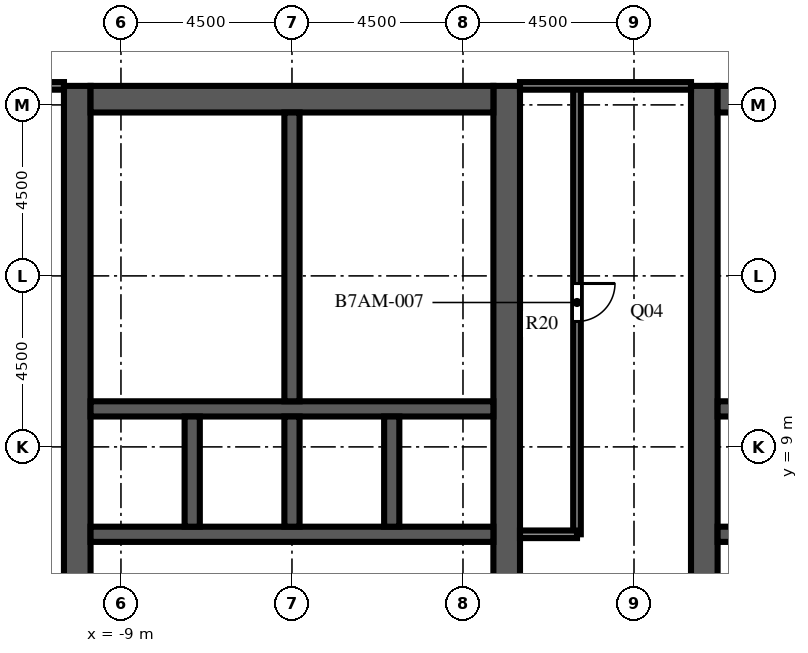
"""IFC4 building model, lengths in metres.
Left out: names, types, materials, properties, quantities, classifications, styles, units other than length and angle.
Written with IfcOpenShell. Run it as: python <this file> out.ifc"""

import sys

from ifc_helpers import new_model, si_unit, direction, frame, frame_2d, origin, place, context, subcontext, project, spatial, rectangle, extrude, element, fill, save


model = new_model("IFC4")
c1 = context("Model", 3, precision=1e-05, world=origin(), true_north=direction((0.0, 1.0)))
c2 = subcontext(c1, "Body", "Model", "MODEL_VIEW")
j1 = project(units=[si_unit("LENGTHUNIT", "METRE"), si_unit("PLANEANGLEUNIT", "RADIAN")], contexts=[c1])
p1 = place(None, origin())
s1 = spatial("IfcSite", under=j1, at=p1, CompositionType="ELEMENT")
p2 = place(p1, origin())
s2 = spatial("IfcBuilding", under=s1, at=p2, CompositionType="ELEMENT")
p3 = place(p2, frame((0.0, 0.0, 260.3)))
s3 = spatial("IfcBuildingStorey", under=s2, at=p3, CompositionType="ELEMENT", Elevation=260.3)
p4 = place(p3, frame((-10.15, -9.0, 0.0), z_axis=(0.0, 0.0, 1.0), x_axis=(0.0, 1.0, 0.0)))
e1 = element("IfcWall", 1, at=p4, inside=s3, PredefinedType="SHEAR", context=c2, shape_type="SweptSolid", body=[
    extrude(rectangle(XDim=27.5, YDim=0.7, at=frame_2d((13.75, 0.0))), origin(), (0.0, 0.0, 1.0), 6.0),
])
p5 = place(p4, frame((12.55, 0.0, 0.0)))
e2 = element("IfcOpeningElement", 2, at=p5, cuts=e1, PredefinedType="OPENING", context=c2, shape_type="SweptSolid", body=[
    extrude(rectangle(XDim=2.4, YDim=2.4, at=frame_2d((1.2, 1.2))), frame((0.0, 0.36, 0.0), z_axis=(0.0, -1.0, 0.0), x_axis=(1.0, 0.0, 0.0)), (0.0, 0.0, 1.0), 0.72),
])
p6 = place(p4, frame((6.825, 0.0, 0.0)))
e3 = element("IfcOpeningElement", 3, at=p6, cuts=e1, PredefinedType="OPENING", context=c2, shape_type="SweptSolid", body=[
    extrude(rectangle(XDim=1.2, YDim=2.1, at=frame_2d((0.6, 1.05))), frame((0.0, 0.36, 0.0), z_axis=(0.0, -1.0, 0.0), x_axis=(1.0, 0.0, 0.0)), (0.0, 0.0, 1.0), 0.72),
])
p7 = place(p4, frame((19.475, 0.0, 0.0)))
e4 = element("IfcOpeningElement", 4, at=p7, cuts=e1, PredefinedType="OPENING", context=c2, shape_type="SweptSolid", body=[
    extrude(rectangle(XDim=1.2, YDim=2.1, at=frame_2d((0.6, 1.05))), frame((0.0, 0.36, 0.0), z_axis=(0.0, -1.0, 0.0), x_axis=(1.0, 0.0, 0.0)), (0.0, 0.0, 1.0), 0.72),
])
p8 = place(p3, frame((1.15, -9.0, 0.0), z_axis=(0.0, 0.0, 1.0), x_axis=(0.0, 1.0, 0.0)))
e5 = element("IfcWall", 5, at=p8, inside=s3, PredefinedType="SHEAR", context=c2, shape_type="SweptSolid", body=[
    extrude(rectangle(XDim=27.5, YDim=0.7, at=frame_2d((13.75, 0.0))), origin(), (0.0, 0.0, 1.0), 6.0),
])
p9 = place(p8, frame((12.55, 0.0, 0.0)))
e6 = element("IfcOpeningElement", 6, at=p9, cuts=e5, PredefinedType="OPENING", context=c2, shape_type="SweptSolid", body=[
    extrude(rectangle(XDim=2.4, YDim=2.4, at=frame_2d((1.2, 1.2))), frame((0.0, 0.36, 0.0), z_axis=(0.0, -1.0, 0.0), x_axis=(1.0, 0.0, 0.0)), (0.0, 0.0, 1.0), 0.72),
])
p10 = place(p8, frame((3.788, 0.0, 0.0)))
e7 = element("IfcOpeningElement", 7, at=p10, cuts=e5, PredefinedType="OPENING", context=c2, shape_type="SweptSolid", body=[
    extrude(rectangle(XDim=0.968, YDim=2.1, at=frame_2d((0.484, 1.05))), frame((0.0, 0.36, 0.0), z_axis=(0.0, -1.0, 0.0), x_axis=(1.0, 0.0, 0.0)), (0.0, 0.0, 1.0), 0.72),
])
p11 = place(p8, frame((23.54, 0.0, 0.0)))
e8 = element("IfcOpeningElement", 8, at=p11, cuts=e5, PredefinedType="OPENING", context=c2, shape_type="SweptSolid", body=[
    extrude(rectangle(XDim=1.2, YDim=2.1, at=frame_2d((0.6, 1.05))), frame((0.0, 0.36, 0.0), z_axis=(0.0, -1.0, 0.0), x_axis=(1.0, 0.0, 0.0)), (0.0, 0.0, 1.0), 0.72),
])
p12 = place(p3, frame((-9.8, 18.15, 0.0), z_axis=(0.0, 0.0, 1.0), x_axis=(1.0, 0.0, 0.0)))
e9 = element("IfcWall", 9, at=p12, inside=s3, PredefinedType="SHEAR", context=c2, shape_type="SweptSolid", body=[
    extrude(rectangle(XDim=10.6, YDim=0.7, at=frame_2d((5.3, 0.0))), origin(), (0.0, 0.0, 1.0), 6.0),
])
p13 = place(p3, frame((-9.8, 6.7, 0.0), z_axis=(0.0, 0.0, 1.0), x_axis=(1.0, 0.0, 0.0)))
e10 = element("IfcWall", 10, at=p13, inside=s3, PredefinedType="SHEAR", context=c2, shape_type="SweptSolid", body=[
    extrude(rectangle(XDim=10.6, YDim=0.4, at=frame_2d((5.3, 0.0))), origin(), (0.0, 0.0, 1.0), 6.0),
])
p14 = place(p13, frame((3.438, 0.0, 0.0)))
e11 = element("IfcOpeningElement", 11, at=p14, cuts=e10, PredefinedType="OPENING", context=c2, shape_type="SweptSolid", body=[
    extrude(rectangle(XDim=1.1, YDim=2.1, at=frame_2d((0.55, 1.05))), frame((0.0, 0.21, 0.0), z_axis=(0.0, -1.0, 0.0), x_axis=(1.0, 0.0, 0.0)), (0.0, 0.0, 1.0), 0.42),
])
p15 = place(p13, frame((6.062, 0.0, 0.0)))
e12 = element("IfcOpeningElement", 12, at=p15, cuts=e10, PredefinedType="OPENING", context=c2, shape_type="SweptSolid", body=[
    extrude(rectangle(XDim=1.1, YDim=2.1, at=frame_2d((0.55, 1.05))), frame((0.0, 0.21, 0.0), z_axis=(0.0, -1.0, 0.0), x_axis=(1.0, 0.0, 0.0)), (0.0, 0.0, 1.0), 0.42),
])
p16 = place(p13, frame((8.812, 0.0, 0.0)))
e13 = element("IfcOpeningElement", 13, at=p16, cuts=e10, PredefinedType="OPENING", context=c2, shape_type="SweptSolid", body=[
    extrude(rectangle(XDim=1.1, YDim=2.1, at=frame_2d((0.55, 1.05))), frame((0.0, 0.21, 0.0), z_axis=(0.0, -1.0, 0.0), x_axis=(1.0, 0.0, 0.0)), (0.0, 0.0, 1.0), 0.42),
])
p17 = place(p13, frame((0.738, 0.0, 0.0)))
e14 = element("IfcOpeningElement", 14, at=p17, cuts=e10, PredefinedType="OPENING", context=c2, shape_type="SweptSolid", body=[
    extrude(rectangle(XDim=1.0, YDim=2.1, at=frame_2d((0.5, 1.05))), frame((0.0, 0.21, 0.0), z_axis=(0.0, -1.0, 0.0), x_axis=(1.0, 0.0, 0.0)), (0.0, 0.0, 1.0), 0.42),
])
p18 = place(p3, frame((-9.8, 10.0, 0.0), z_axis=(0.0, 0.0, 1.0), x_axis=(1.0, 0.0, 0.0)))
e15 = element("IfcWall", 15, at=p18, inside=s3, PredefinedType="SHEAR", context=c2, shape_type="SweptSolid", body=[
    extrude(rectangle(XDim=10.6, YDim=0.4, at=frame_2d((5.3, 0.0))), origin(), (0.0, 0.0, 1.0), 6.0),
])
for number, where, z_axis, x_axis in (
    (16, (-7.125, 6.9, 0.0), (0.0, 0.0, 1.0), (0.0, 1.0, 0.0)),
    (17, (-4.5, 6.9, 0.0), (0.0, 0.0, 1.0), (0.0, 1.0, 0.0)),
    (18, (-1.875, 6.9, 0.0), (0.0, 0.0, 1.0), (0.0, 1.0, 0.0)),
):
    element("IfcWall", number, at=place(p3, frame(where, z_axis=z_axis, x_axis=x_axis)), inside=s3, PredefinedType="SHEAR", context=c2, shape_type="SweptSolid", body=[
        extrude(rectangle(XDim=2.9, YDim=0.4, at=frame_2d((1.45, 0.0))), origin(), (0.0, 0.0, 1.0), 6.0),
    ])
p19 = place(p3, frame((-4.5, 10.2, 0.0), z_axis=(0.0, 0.0, 1.0), x_axis=(0.0, 1.0, 0.0)))
e19 = element("IfcWall", 19, at=p19, inside=s3, PredefinedType="SHEAR", context=c2, shape_type="SweptSolid", body=[
    extrude(rectangle(XDim=7.6, YDim=0.4, at=frame_2d((3.8, 0.0))), origin(), (0.0, 0.0, 1.0), 6.0),
])
p20 = place(p3, frame((6.35, -9.0, 0.0), z_axis=(0.0, 0.0, 1.0), x_axis=(0.0, 1.0, 0.0)))
e20 = element("IfcWall", 20, at=p20, inside=s3, PredefinedType="SHEAR", context=c2, shape_type="SweptSolid", body=[
    extrude(rectangle(XDim=27.5, YDim=0.7, at=frame_2d((13.75, 0.0))), origin(), (0.0, 0.0, 1.0), 6.0),
])
p21 = place(p20, frame((12.55, 0.0, 0.0)))
e21 = element("IfcOpeningElement", 21, at=p21, cuts=e20, PredefinedType="OPENING", context=c2, shape_type="SweptSolid", body=[
    extrude(rectangle(XDim=2.4, YDim=2.4, at=frame_2d((1.2, 1.2))), frame((0.0, 0.36, 0.0), z_axis=(0.0, -1.0, 0.0), x_axis=(1.0, 0.0, 0.0)), (0.0, 0.0, 1.0), 0.72),
])
p22 = place(p20, frame((3.788, 0.0, 0.0)))
e22 = element("IfcOpeningElement", 22, at=p22, cuts=e20, PredefinedType="OPENING", context=c2, shape_type="SweptSolid", body=[
    extrude(rectangle(XDim=0.968, YDim=2.1, at=frame_2d((0.484, 1.05))), frame((0.0, 0.36, 0.0), z_axis=(0.0, -1.0, 0.0), x_axis=(1.0, 0.0, 0.0)), (0.0, 0.0, 1.0), 0.72),
])
p23 = place(p20, frame((23.54, 0.0, 0.0)))
e23 = element("IfcOpeningElement", 23, at=p23, cuts=e20, PredefinedType="OPENING", context=c2, shape_type="SweptSolid", body=[
    extrude(rectangle(XDim=1.2, YDim=2.1, at=frame_2d((0.6, 1.05))), frame((0.0, 0.36, 0.0), z_axis=(0.0, -1.0, 0.0), x_axis=(1.0, 0.0, 0.0)), (0.0, 0.0, 1.0), 0.72),
])
p24 = place(p3, frame((6.7, 18.15, 0.0), z_axis=(0.0, 0.0, 1.0), x_axis=(1.0, 0.0, 0.0)))
e24 = element("IfcWall", 24, at=p24, inside=s3, PredefinedType="SHEAR", context=c2, shape_type="SweptSolid", body=[
    extrude(rectangle(XDim=10.6, YDim=0.7, at=frame_2d((5.3, 0.0))), origin(), (0.0, 0.0, 1.0), 6.0),
])
p25 = place(p3, frame((6.7, 6.7, 0.0), z_axis=(0.0, 0.0, 1.0), x_axis=(1.0, 0.0, 0.0)))
e25 = element("IfcWall", 25, at=p25, inside=s3, PredefinedType="SHEAR", context=c2, shape_type="SweptSolid", body=[
    extrude(rectangle(XDim=10.6, YDim=0.4, at=frame_2d((5.3, 0.0))), origin(), (0.0, 0.0, 1.0), 6.0),
])
p26 = place(p25, frame((3.438, 0.0, 0.0)))
e26 = element("IfcOpeningElement", 26, at=p26, cuts=e25, PredefinedType="OPENING", context=c2, shape_type="SweptSolid", body=[
    extrude(rectangle(XDim=1.1, YDim=2.1, at=frame_2d((0.55, 1.05))), frame((0.0, 0.21, 0.0), z_axis=(0.0, -1.0, 0.0), x_axis=(1.0, 0.0, 0.0)), (0.0, 0.0, 1.0), 0.42),
])
p27 = place(p25, frame((6.062, 0.0, 0.0)))
e27 = element("IfcOpeningElement", 27, at=p27, cuts=e25, PredefinedType="OPENING", context=c2, shape_type="SweptSolid", body=[
    extrude(rectangle(XDim=1.1, YDim=2.1, at=frame_2d((0.55, 1.05))), frame((0.0, 0.21, 0.0), z_axis=(0.0, -1.0, 0.0), x_axis=(1.0, 0.0, 0.0)), (0.0, 0.0, 1.0), 0.42),
])
p28 = place(p25, frame((8.812, 0.0, 0.0)))
e28 = element("IfcOpeningElement", 28, at=p28, cuts=e25, PredefinedType="OPENING", context=c2, shape_type="SweptSolid", body=[
    extrude(rectangle(XDim=1.1, YDim=2.1, at=frame_2d((0.55, 1.05))), frame((0.0, 0.21, 0.0), z_axis=(0.0, -1.0, 0.0), x_axis=(1.0, 0.0, 0.0)), (0.0, 0.0, 1.0), 0.42),
])
p29 = place(p25, frame((0.738, 0.0, 0.0)))
e29 = element("IfcOpeningElement", 29, at=p29, cuts=e25, PredefinedType="OPENING", context=c2, shape_type="SweptSolid", body=[
    extrude(rectangle(XDim=1.0, YDim=2.1, at=frame_2d((0.5, 1.05))), frame((0.0, 0.21, 0.0), z_axis=(0.0, -1.0, 0.0), x_axis=(1.0, 0.0, 0.0)), (0.0, 0.0, 1.0), 0.42),
])
p30 = place(p3, frame((6.7, 10.0, 0.0), z_axis=(0.0, 0.0, 1.0), x_axis=(1.0, 0.0, 0.0)))
e30 = element("IfcWall", 30, at=p30, inside=s3, PredefinedType="SHEAR", context=c2, shape_type="SweptSolid", body=[
    extrude(rectangle(XDim=10.6, YDim=0.4, at=frame_2d((5.3, 0.0))), origin(), (0.0, 0.0, 1.0), 6.0),
])
p31 = place(p3, frame((-0.5, 12.48, 0.0), z_axis=(0.0, 0.0, 1.0), x_axis=(1.0, 0.0, 0.0)))
e31 = element("IfcWall", 31, at=p31, inside=s3, PredefinedType="PARTITIONING", context=c2, shape_type="SweptSolid", body=[
    extrude(rectangle(XDim=1.3, YDim=0.1, at=frame_2d((0.65, 0.0))), origin(), (0.0, 0.0, 1.0), 5.55),
])
p32 = place(p31, frame((0.2, 0.0, 0.0)))
e32 = element("IfcOpeningElement", 32, at=p32, cuts=e31, PredefinedType="OPENING", context=c2, shape_type="SweptSolid", body=[
    extrude(rectangle(XDim=0.9, YDim=2.1, at=frame_2d((0.45, 1.05))), frame((0.0, 0.06, 0.0), z_axis=(0.0, -1.0, 0.0), x_axis=(1.0, 0.0, 0.0)), (0.0, 0.0, 1.0), 0.12),
])
p33 = place(p3, frame((-4.3, 12.48, 0.0), z_axis=(0.0, 0.0, 1.0), x_axis=(1.0, 0.0, 0.0)))
e33 = element("IfcWall", 33, at=p33, inside=s3, PredefinedType="PARTITIONING", context=c2, shape_type="SweptSolid", body=[
    extrude(rectangle(XDim=3.8, YDim=0.1, at=frame_2d((1.9, 0.0))), origin(), (0.0, 0.0, 1.0), 5.55),
])
p34 = place(p3, frame((-0.5, 12.48, 0.0), z_axis=(0.0, 0.0, 1.0), x_axis=(0.0, 1.0, 0.0)))
e34 = element("IfcWall", 34, at=p34, inside=s3, PredefinedType="PARTITIONING", context=c2, shape_type="SweptSolid", body=[
    extrude(rectangle(XDim=2.66, YDim=0.1, at=frame_2d((1.33, 0.0))), origin(), (0.0, 0.0, 1.0), 5.55),
])
p35 = place(p34, frame((0.83, 0.0, 0.0)))
e35 = element("IfcOpeningElement", 35, at=p35, cuts=e34, PredefinedType="OPENING", context=c2, shape_type="SweptSolid", body=[
    extrude(rectangle(XDim=1.0, YDim=2.1, at=frame_2d((0.5, 1.05))), frame((0.0, 0.06, 0.0), z_axis=(0.0, -1.0, 0.0), x_axis=(1.0, 0.0, 0.0)), (0.0, 0.0, 1.0), 0.12),
])
p36 = place(p3, frame((-0.5, 15.14, 0.0), z_axis=(0.0, 0.0, 1.0), x_axis=(0.0, 1.0, 0.0)))
e36 = element("IfcWall", 36, at=p36, inside=s3, PredefinedType="PARTITIONING", context=c2, shape_type="SweptSolid", body=[
    extrude(rectangle(XDim=2.66, YDim=0.1, at=frame_2d((1.33, 0.0))), origin(), (0.0, 0.0, 1.0), 5.55),
])
p37 = place(p36, frame((0.83, 0.0, 0.0)))
e37 = element("IfcOpeningElement", 37, at=p37, cuts=e36, PredefinedType="OPENING", context=c2, shape_type="SweptSolid", body=[
    extrude(rectangle(XDim=1.0, YDim=2.1, at=frame_2d((0.5, 1.05))), frame((0.0, 0.06, 0.0), z_axis=(0.0, -1.0, 0.0), x_axis=(1.0, 0.0, 0.0)), (0.0, 0.0, 1.0), 0.12),
])
p38 = place(p3, frame((-4.3, 15.14, 0.0), z_axis=(0.0, 0.0, 1.0), x_axis=(1.0, 0.0, 0.0)))
e38 = element("IfcWall", 38, at=p38, inside=s3, PredefinedType="PARTITIONING", context=c2, shape_type="SweptSolid", body=[
    extrude(rectangle(XDim=3.8, YDim=0.1, at=frame_2d((1.9, 0.0))), origin(), (0.0, 0.0, 1.0), 5.55),
])
p39 = place(p3, frame((6.7, 12.48, 0.0), z_axis=(0.0, 0.0, 1.0), x_axis=(1.0, 0.0, 0.0)))
e39 = element("IfcWall", 39, at=p39, inside=s3, PredefinedType="PARTITIONING", context=c2, shape_type="SweptSolid", body=[
    extrude(rectangle(XDim=1.3, YDim=0.1, at=frame_2d((0.65, 0.0))), origin(), (0.0, 0.0, 1.0), 5.55),
])
p40 = place(p39, frame((0.2, 0.0, 0.0)))
e40 = element("IfcOpeningElement", 40, at=p40, cuts=e39, PredefinedType="OPENING", context=c2, shape_type="SweptSolid", body=[
    extrude(rectangle(XDim=0.9, YDim=2.1, at=frame_2d((0.45, 1.05))), frame((0.0, 0.06, 0.0), z_axis=(0.0, -1.0, 0.0), x_axis=(1.0, 0.0, 0.0)), (0.0, 0.0, 1.0), 0.12),
])
p41 = place(p3, frame((3.0, 6.7, 0.0), z_axis=(0.0, 0.0, 1.0), x_axis=(0.0, 1.0, 0.0)))
e41 = element("IfcWall", 41, at=p41, inside=s3, PredefinedType="PARTITIONING", context=c2, shape_type="SweptSolid", body=[
    extrude(rectangle(XDim=11.8, YDim=0.2, at=frame_2d((5.9, 0.0))), origin(), (0.0, 0.0, 1.0), 5.55),
])
p42 = place(p41, frame((5.6, 0.0, 0.0)))
e42 = element("IfcOpeningElement", 42, at=p42, cuts=e41, PredefinedType="OPENING", context=c2, shape_type="SweptSolid", body=[
    extrude(rectangle(XDim=1.0, YDim=2.1, at=frame_2d((0.5, 1.05))), frame((0.0, 0.11, 0.0), z_axis=(0.0, -1.0, 0.0), x_axis=(1.0, 0.0, 0.0)), (0.0, 0.0, 1.0), 0.22),
])
p43 = place(p3, frame((1.5, 6.7, 0.0), z_axis=(0.0, 0.0, 1.0), x_axis=(1.0, 0.0, 0.0)))
e43 = element("IfcWall", 43, at=p43, inside=s3, PredefinedType="PARTITIONING", context=c2, shape_type="SweptSolid", body=[
    extrude(rectangle(XDim=1.5, YDim=0.2, at=frame_2d((0.75, 0.0))), origin(), (0.0, 0.0, 1.0), 5.55),
])
p44 = place(p3, frame((-13.5, 18.5, 0.0), z_axis=(0.0, 0.0, 1.0), x_axis=(1.0, 0.0, 0.0)))
e44 = element("IfcWall", 44, at=p44, inside=s3, PredefinedType="PARTITIONING", context=c2, shape_type="SweptSolid", body=[
    extrude(rectangle(XDim=3.0, YDim=0.2, at=frame_2d((1.5, 0.0))), origin(), (0.0, 0.0, 1.0), 3.72),
])
p45 = place(p3, frame((1.5, 18.5, 0.0), z_axis=(0.0, 0.0, 1.0), x_axis=(1.0, 0.0, 0.0)))
e45 = element("IfcWall", 45, at=p45, inside=s3, PredefinedType="PARTITIONING", context=c2, shape_type="SweptSolid", body=[
    extrude(rectangle(XDim=4.5, YDim=0.2, at=frame_2d((2.25, 0.0))), origin(), (0.0, 0.0, 1.0), 5.55),
])
p46 = place(p14, origin())
e46 = element("IfcDoor", 46, at=p46, inside=s3, OperationType="DOUBLE_DOOR_SLIDING", PredefinedType="DOOR", context=c2, shape_type="SweptSolid", body=[
    extrude(rectangle(XDim=1.1, YDim=2.1, at=frame_2d((0.55, 1.05))), frame((0.0, 0.025, 0.0), z_axis=(0.0, -1.0, 0.0), x_axis=(1.0, 0.0, 0.0)), (0.0, 0.0, 1.0), 0.05),
])
fill(e11, e46)
p47 = place(p15, origin())
e47 = element("IfcDoor", 47, at=p47, inside=s3, OperationType="DOUBLE_DOOR_SLIDING", PredefinedType="DOOR", context=c2, shape_type="SweptSolid", body=[
    extrude(rectangle(XDim=1.1, YDim=2.1, at=frame_2d((0.55, 1.05))), frame((0.0, 0.025, 0.0), z_axis=(0.0, -1.0, 0.0), x_axis=(1.0, 0.0, 0.0)), (0.0, 0.0, 1.0), 0.05),
])
fill(e12, e47)
p48 = place(p16, origin())
e48 = element("IfcDoor", 48, at=p48, inside=s3, OperationType="DOUBLE_DOOR_SLIDING", PredefinedType="DOOR", context=c2, shape_type="SweptSolid", body=[
    extrude(rectangle(XDim=1.1, YDim=2.1, at=frame_2d((0.55, 1.05))), frame((0.0, 0.025, 0.0), z_axis=(0.0, -1.0, 0.0), x_axis=(1.0, 0.0, 0.0)), (0.0, 0.0, 1.0), 0.05),
])
fill(e13, e48)
p49 = place(p5, origin())
e49 = element("IfcDoor", 49, at=p49, inside=s3, OperationType="DOUBLE_DOOR_DOUBLE_SWING", PredefinedType="DOOR", context=c2, shape_type="SweptSolid", body=[
    extrude(rectangle(XDim=2.4, YDim=2.4, at=frame_2d((1.2, 1.2))), frame((0.0, 0.025, 0.0), z_axis=(0.0, -1.0, 0.0), x_axis=(1.0, 0.0, 0.0)), (0.0, 0.0, 1.0), 0.05),
])
fill(e2, e49)
p50 = place(p9, origin())
e50 = element("IfcDoor", 50, at=p50, inside=s3, OperationType="DOUBLE_DOOR_DOUBLE_SWING", PredefinedType="DOOR", context=c2, shape_type="SweptSolid", body=[
    extrude(rectangle(XDim=2.4, YDim=2.4, at=frame_2d((1.2, 1.2))), frame((0.0, 0.025, 0.0), z_axis=(0.0, -1.0, 0.0), x_axis=(1.0, 0.0, 0.0)), (0.0, 0.0, 1.0), 0.05),
])
fill(e6, e50)
p51 = place(p21, origin())
e51 = element("IfcDoor", 51, at=p51, inside=s3, OperationType="DOUBLE_DOOR_DOUBLE_SWING", PredefinedType="DOOR", context=c2, shape_type="SweptSolid", body=[
    extrude(rectangle(XDim=2.4, YDim=2.4, at=frame_2d((1.2, 1.2))), frame((0.0, 0.025, 0.0), z_axis=(0.0, -1.0, 0.0), x_axis=(1.0, 0.0, 0.0)), (0.0, 0.0, 1.0), 0.05),
])
fill(e21, e51)
p52 = place(p7, origin())
e52 = element("IfcDoor", 52, at=p52, inside=s3, OperationType="SINGLE_SWING_LEFT", PredefinedType="DOOR", context=c2, shape_type="SweptSolid", body=[
    extrude(rectangle(XDim=1.2, YDim=2.1, at=frame_2d((0.6, 1.05))), frame((0.0, 0.025, 0.0), z_axis=(0.0, -1.0, 0.0), x_axis=(1.0, 0.0, 0.0)), (0.0, 0.0, 1.0), 0.05),
])
fill(e4, e52)
p53 = place(p17, origin())
e53 = element("IfcDoor", 53, at=p53, inside=s3, OperationType="SINGLE_SWING_LEFT", PredefinedType="DOOR", context=c2, shape_type="SweptSolid", body=[
    extrude(rectangle(XDim=1.0, YDim=2.1, at=frame_2d((0.5, 1.05))), frame((0.0, 0.025, 0.0), z_axis=(0.0, -1.0, 0.0), x_axis=(1.0, 0.0, 0.0)), (0.0, 0.0, 1.0), 0.05),
])
fill(e14, e53)
p54 = place(p32, origin())
e54 = element("IfcDoor", 54, at=p54, inside=s3, OperationType="SINGLE_SWING_LEFT", PredefinedType="DOOR", context=c2, shape_type="SweptSolid", body=[
    extrude(rectangle(XDim=0.9, YDim=2.1, at=frame_2d((0.45, 1.05))), frame((0.0, 0.025, 0.0), z_axis=(0.0, -1.0, 0.0), x_axis=(1.0, 0.0, 0.0)), (0.0, 0.0, 1.0), 0.05),
])
fill(e32, e54)
p55 = place(p11, origin())
e55 = element("IfcDoor", 55, at=p55, inside=s3, OperationType="SINGLE_SWING_RIGHT", PredefinedType="DOOR", context=c2, shape_type="SweptSolid", body=[
    extrude(rectangle(XDim=1.2, YDim=2.1, at=frame_2d((0.6, 1.05))), frame((0.0, 0.325, 0.0), z_axis=(0.0, -1.0, 0.0), x_axis=(1.0, 0.0, 0.0)), (0.0, 0.0, 1.0), 0.05),
])
fill(e8, e55)
p56 = place(p35, origin())
e56 = element("IfcDoor", 56, at=p56, inside=s3, OperationType="SINGLE_SWING_LEFT", PredefinedType="DOOR", context=c2, shape_type="SweptSolid", body=[
    extrude(rectangle(XDim=1.0, YDim=2.1, at=frame_2d((0.5, 1.05))), frame((0.0, 0.025, 0.0), z_axis=(0.0, -1.0, 0.0), x_axis=(1.0, 0.0, 0.0)), (0.0, 0.0, 1.0), 0.05),
])
fill(e35, e56)
p57 = place(p37, origin())
e57 = element("IfcDoor", 57, at=p57, inside=s3, OperationType="SINGLE_SWING_RIGHT", PredefinedType="DOOR", context=c2, shape_type="SweptSolid", body=[
    extrude(rectangle(XDim=1.0, YDim=2.1, at=frame_2d((0.5, 1.05))), frame((0.0, 0.025, 0.0), z_axis=(0.0, -1.0, 0.0), x_axis=(1.0, 0.0, 0.0)), (0.0, 0.0, 1.0), 0.05),
])
fill(e37, e57)
p58 = place(p40, origin())
e58 = element("IfcDoor", 58, at=p58, inside=s3, OperationType="SINGLE_SWING_RIGHT", PredefinedType="DOOR", context=c2, shape_type="SweptSolid", body=[
    extrude(rectangle(XDim=0.9, YDim=2.1, at=frame_2d((0.45, 1.05))), frame((0.0, 0.025, 0.0), z_axis=(0.0, -1.0, 0.0), x_axis=(1.0, 0.0, 0.0)), (0.0, 0.0, 1.0), 0.05),
])
fill(e40, e58)
p59 = place(p23, origin())
e59 = element("IfcDoor", 59, at=p59, inside=s3, OperationType="SINGLE_SWING_LEFT", PredefinedType="DOOR", context=c2, shape_type="SweptSolid", body=[
    extrude(rectangle(XDim=1.2, YDim=2.1, at=frame_2d((0.6, 1.05))), frame((0.0, -0.275, 0.0), z_axis=(0.0, -1.0, 0.0), x_axis=(1.0, 0.0, 0.0)), (0.0, 0.0, 1.0), 0.05),
])
fill(e23, e59)
p60 = place(p42, origin())
e60 = element("IfcDoor", 60, at=p60, inside=s3, OperationType="SINGLE_SWING_RIGHT", PredefinedType="DOOR", context=c2, shape_type="SweptSolid", body=[
    extrude(rectangle(XDim=1.0, YDim=2.1, at=frame_2d((0.5, 1.05))), frame((0.0, 0.025, 0.0), z_axis=(0.0, -1.0, 0.0), x_axis=(1.0, 0.0, 0.0)), (0.0, 0.0, 1.0), 0.05),
])
fill(e42, e60)
save(model, sys.argv[1])
